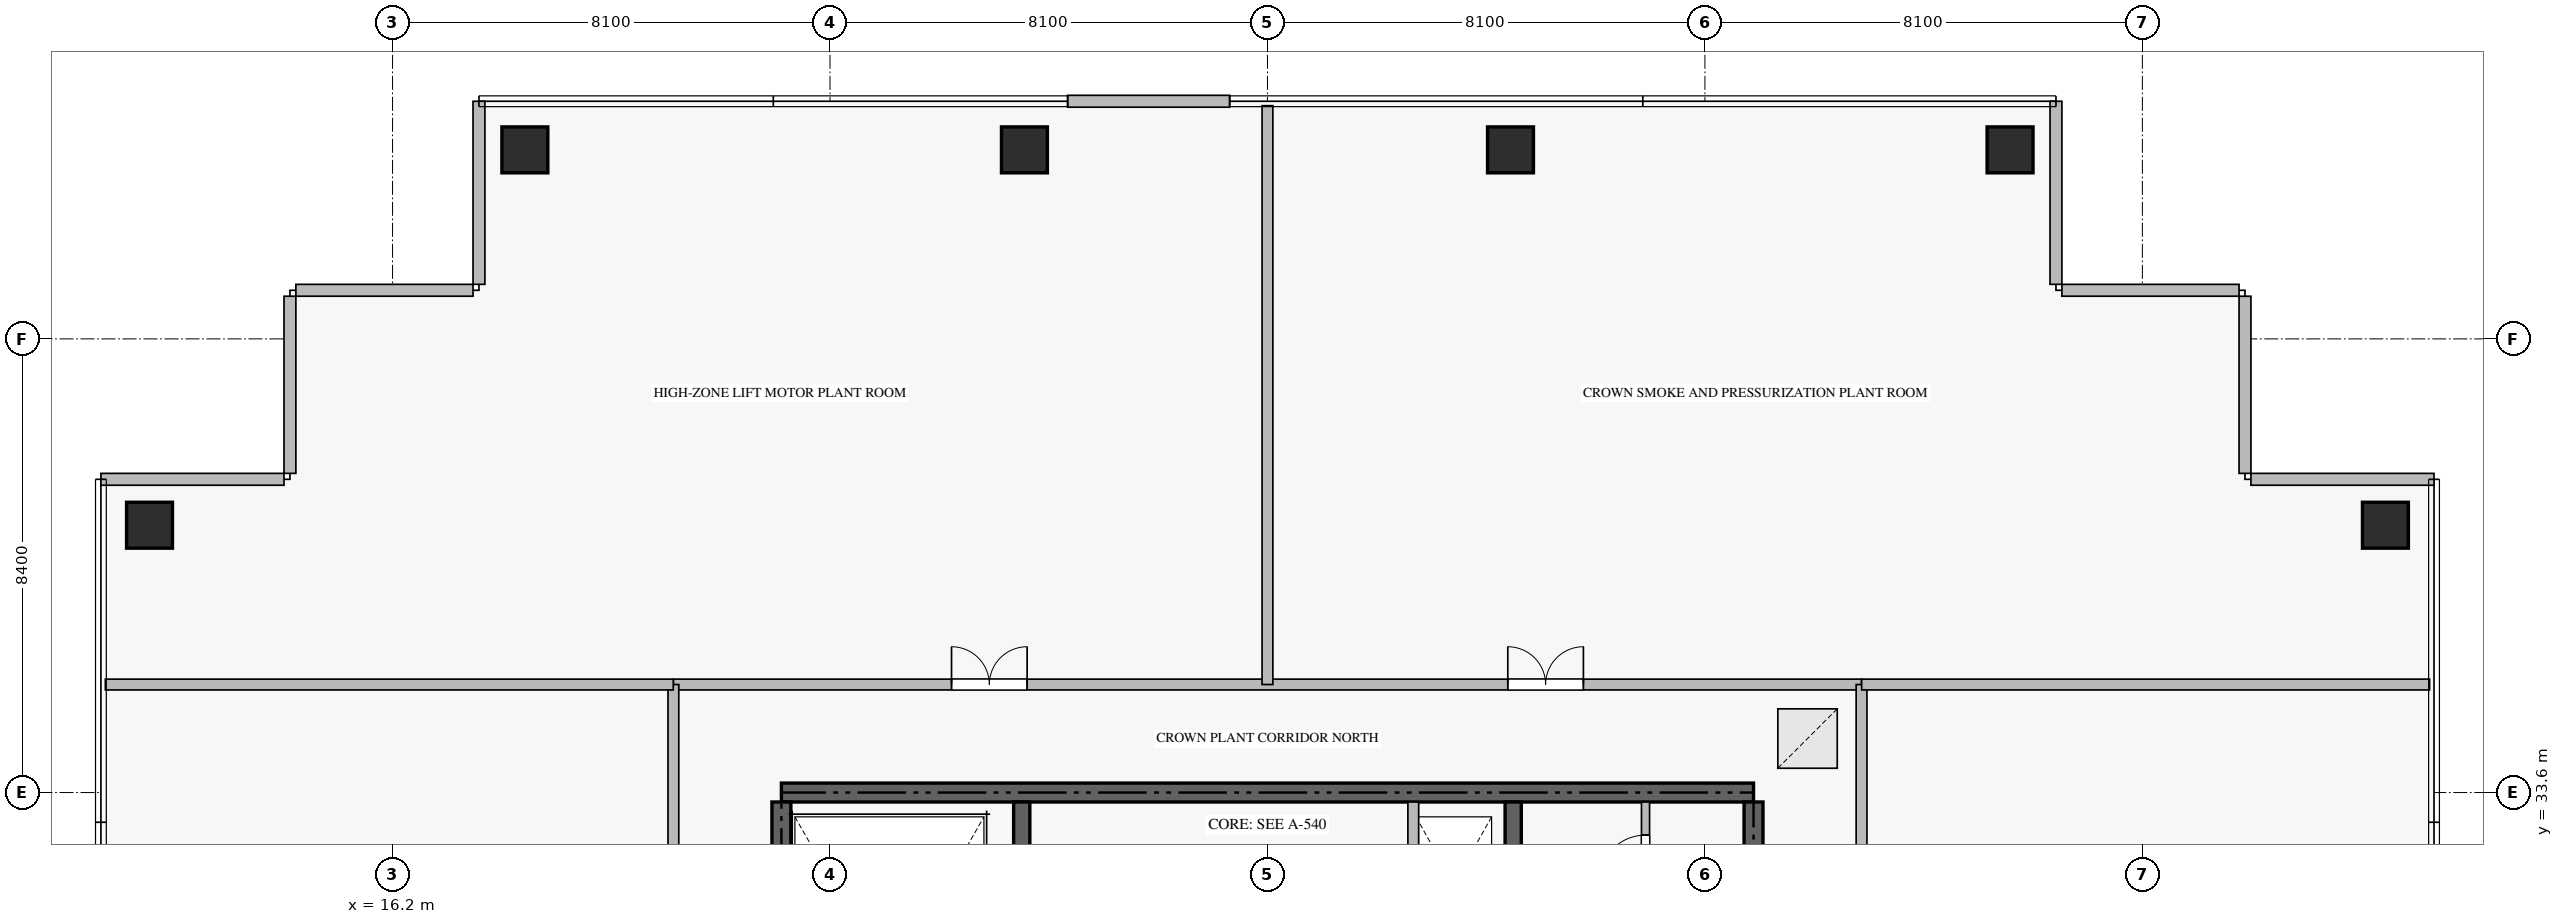
"""IFC4 building model, lengths in metres.
Left out: names, types, materials, properties, quantities, classifications, styles, units other than length and angle.
Written with IfcOpenShell. Run it as: python <this file> out.ifc"""

import sys

from ifc_helpers import new_model, si_unit, direction, frame, frame_2d, origin, origin_2d, place, context, subcontext, project, spatial, rectangle, extrude, source, transform, mapped, element, fill, save


model = new_model("IFC4")
c1 = context("Model", 3, precision=1e-05, world=origin(), true_north=direction((0.0, 1.0)))
c2 = subcontext(c1, "Body", "Model", "MODEL_VIEW")
j1 = project(units=[si_unit("LENGTHUNIT", "METRE"), si_unit("PLANEANGLEUNIT", "RADIAN")], contexts=[c1])
p1 = place(None, origin())
s1 = spatial("IfcSite", under=j1, at=p1, CompositionType="ELEMENT")
p2 = place(p1, origin())
s2 = spatial("IfcBuilding", under=s1, at=p2, CompositionType="ELEMENT")
p3 = place(p2, frame((0.0, 0.0, 365.75)))
s3 = spatial("IfcBuildingStorey", under=s2, at=p3, CompositionType="ELEMENT", Elevation=365.75)
p4 = place(p3, frame((41.4, 33.6, -0.36), z_axis=(0.0, 0.0, 1.0), x_axis=(-1.0, 0.0, 0.0)))
e1 = element("IfcWall", 1, at=p4, inside=s3, PredefinedType="SHEAR", context=c2, shape_type="SweptSolid", body=[
    extrude(rectangle(XDim=18.0, YDim=0.35, at=frame_2d((9.0, 0.0))), origin(), (0.0, 0.0, 1.0), 5.258),
])
p5 = place(p3, frame((23.4, 24.25, -0.36), z_axis=(0.0, 0.0, 1.0), x_axis=(0.0, 1.0, 0.0)))
e2 = element("IfcWall", 2, at=p5, inside=s3, PredefinedType="SHEAR", context=c2, shape_type="SweptSolid", body=[
    extrude(rectangle(XDim=9.175, YDim=0.35, at=frame_2d((4.587, 0.0))), origin(), (0.0, 0.0, 1.0), 5.258),
])
p6 = place(p3, frame((41.4, 27.75, -0.36), z_axis=(0.0, 0.0, 1.0), x_axis=(0.0, 1.0, 0.0)))
e3 = element("IfcWall", 3, at=p6, inside=s3, PredefinedType="SHEAR", context=c2, shape_type="SweptSolid", body=[
    extrude(rectangle(XDim=5.675, YDim=0.35, at=frame_2d((2.837, 0.0))), origin(), (0.0, 0.0, 1.0), 5.258),
])
p7 = place(p3, frame((27.85, 23.55, -0.36), z_axis=(0.0, 0.0, 1.0), x_axis=(0.0, 1.0, 0.0)))
e4 = element("IfcWall", 4, at=p7, inside=s3, PredefinedType="SHEAR", context=c2, shape_type="SweptSolid", body=[
    extrude(rectangle(XDim=9.875, YDim=0.3, at=frame_2d((4.938, 0.0))), origin(), (0.0, 0.0, 1.0), 5.258),
])
p8 = place(p3, frame((36.95, 27.05, -0.36), z_axis=(0.0, 0.0, 1.0), x_axis=(0.0, 1.0, 0.0)))
e5 = element("IfcWall", 5, at=p8, inside=s3, PredefinedType="SHEAR", context=c2, shape_type="SweptSolid", body=[
    extrude(rectangle(XDim=6.375, YDim=0.3, at=frame_2d((3.188, 0.0))), origin(), (0.0, 0.0, 1.0), 5.258),
])
m1 = source(origin(), c2, "Body", "SweptSolid", [
    extrude(rectangle(XDim=0.85, YDim=0.85, at=origin_2d()), origin(), (0.0, 0.0, 1.0), 5.26),
])
for number, where, z_axis, x_axis in (
    (6, (18.65, 45.5, -0.36), (0.0, 0.0, 1.0), (1.0, 0.0, 0.0)),
    (7, (27.9, 45.5, -0.36), (0.0, 0.0, 1.0), (1.0, 0.0, 0.0)),
    (8, (36.9, 45.5, -0.36), (0.0, 0.0, 1.0), (1.0, 0.0, 0.0)),
    (9, (46.15, 45.5, -0.36), (0.0, 0.0, 1.0), (1.0, 0.0, 0.0)),
    (10, (53.1, 38.55, -0.36), (0.0, 0.0, 1.0), (1.0, 0.0, 0.0)),
    (11, (11.7, 38.55, -0.36), (0.0, 0.0, 1.0), (1.0, 0.0, 0.0)),
):
    element("IfcColumn", number, at=place(p3, frame(where, z_axis=z_axis, x_axis=x_axis)), inside=s3, PredefinedType="COLUMN", context=c2, shape_type="MappedRepresentation", body=[
        mapped(m1, transform((0.0, 0.0, 0.0), scale=1.0)),
    ])
p9 = place(p3, frame((54.0, 39.4, 0.0), z_axis=(0.0, 0.0, 1.0), x_axis=(-1.0, 0.0, 0.0)))
e12 = element("IfcWall", 12, at=p9, inside=s3, PredefinedType="ELEMENTEDWALL", context=c2, shape_type="SweptSolid", body=[
    extrude(rectangle(XDim=3.39, YDim=0.22, at=frame_2d((1.695, 0.0))), origin(), (0.0, 0.0, 1.0), 4.885),
])
p10 = place(p3, frame((50.5, 39.51, 0.0), z_axis=(0.0, 0.0, 1.0), x_axis=(0.0, 1.0, 0.0)))
e13 = element("IfcWall", 13, at=p10, inside=s3, PredefinedType="ELEMENTEDWALL", context=c2, shape_type="SweptSolid", body=[
    extrude(rectangle(XDim=3.28, YDim=0.22, at=frame_2d((1.64, 0.0))), origin(), (0.0, 0.0, 1.0), 4.885),
])
p11 = place(p3, frame((50.39, 42.9, 0.0), z_axis=(0.0, 0.0, 1.0), x_axis=(-1.0, 0.0, 0.0)))
e14 = element("IfcWall", 14, at=p11, inside=s3, PredefinedType="ELEMENTEDWALL", context=c2, shape_type="SweptSolid", body=[
    extrude(rectangle(XDim=3.28, YDim=0.22, at=frame_2d((1.64, 0.0))), origin(), (0.0, 0.0, 1.0), 4.885),
])
p12 = place(p3, frame((47.0, 43.01, 0.0), z_axis=(0.0, 0.0, 1.0), x_axis=(0.0, 1.0, 0.0)))
e15 = element("IfcWall", 15, at=p12, inside=s3, PredefinedType="ELEMENTEDWALL", context=c2, shape_type="SweptSolid", body=[
    extrude(rectangle(XDim=3.39, YDim=0.22, at=frame_2d((1.695, 0.0))), origin(), (0.0, 0.0, 1.0), 4.885),
])
p13 = place(p3, frame((31.7, 46.4, 0.0), z_axis=(0.0, 0.0, 1.0), x_axis=(-1.0, 0.0, 0.0)))
e16 = element("IfcWall", 16, at=p13, inside=s3, PredefinedType="ELEMENTEDWALL", context=c2, shape_type="SweptSolid", body=[
    extrude(rectangle(XDim=3.0, YDim=0.22, at=frame_2d((1.5, 0.0))), origin(), (0.0, 0.0, 1.0), 4.885),
])
p14 = place(p3, frame((17.8, 46.4, 0.0), z_axis=(0.0, 0.0, 1.0), x_axis=(0.0, -1.0, 0.0)))
e17 = element("IfcWall", 17, at=p14, inside=s3, PredefinedType="ELEMENTEDWALL", context=c2, shape_type="SweptSolid", body=[
    extrude(rectangle(XDim=3.39, YDim=0.22, at=frame_2d((1.695, 0.0))), origin(), (0.0, 0.0, 1.0), 4.885),
])
for number, where, z_axis, x_axis in (
    (18, (17.69, 42.9, 0.0), (0.0, 0.0, 1.0), (-1.0, 0.0, 0.0)),
    (19, (14.3, 42.79, 0.0), (0.0, 0.0, 1.0), (0.0, -1.0, 0.0)),
):
    element("IfcWall", number, at=place(p3, frame(where, z_axis=z_axis, x_axis=x_axis)), inside=s3, PredefinedType="ELEMENTEDWALL", context=c2, shape_type="SweptSolid", body=[
        extrude(rectangle(XDim=3.28, YDim=0.22, at=frame_2d((1.64, 0.0))), origin(), (0.0, 0.0, 1.0), 4.885),
    ])
p15 = place(p3, frame((14.19, 39.4, 0.0), z_axis=(0.0, 0.0, 1.0), x_axis=(-1.0, 0.0, 0.0)))
e20 = element("IfcWall", 20, at=p15, inside=s3, PredefinedType="ELEMENTEDWALL", context=c2, shape_type="SweptSolid", body=[
    extrude(rectangle(XDim=3.39, YDim=0.22, at=frame_2d((1.695, 0.0))), origin(), (0.0, 0.0, 1.0), 4.885),
])
p16 = place(p3, frame((35.1, 30.75, 0.0), z_axis=(0.0, 0.0, 1.0), x_axis=(0.0, 1.0, 0.0)))
e21 = element("IfcWall", 21, at=p16, inside=s3, PredefinedType="STANDARD", context=c2, shape_type="SweptSolid", body=[
    extrude(rectangle(XDim=2.675, YDim=0.2, at=frame_2d((1.337, 0.0))), origin(), (0.0, 0.0, 1.0), 4.9),
])
p17 = place(p3, frame((39.4, 31.35, 0.0), z_axis=(0.0, 0.0, 1.0), x_axis=(0.0, 1.0, 0.0)))
e22 = element("IfcWall", 22, at=p17, inside=s3, PredefinedType="PARTITIONING", context=c2, shape_type="SweptSolid", body=[
    extrude(rectangle(XDim=2.075, YDim=0.15, at=frame_2d((1.038, 0.0))), origin(), (0.0, 0.0, 1.0), 4.9),
])
p18 = place(p17, frame((0.612, 0.0, 0.0)))
e23 = element("IfcOpeningElement", 23, at=p18, cuts=e22, PredefinedType="OPENING", context=c2, shape_type="SweptSolid", body=[
    extrude(rectangle(XDim=0.85, YDim=2.1, at=frame_2d((0.425, 1.05))), frame((0.0, 0.085, 0.0), z_axis=(0.0, -1.0, 0.0), x_axis=(1.0, 0.0, 0.0)), (0.0, 0.0, 1.0), 0.17),
])
p19 = place(p3, frame((21.4, 35.6, 0.0), z_axis=(0.0, 0.0, 1.0), x_axis=(1.0, 0.0, 0.0)))
e24 = element("IfcWall", 24, at=p19, inside=s3, PredefinedType="STANDARD", context=c2, shape_type="SweptSolid", body=[
    extrude(rectangle(XDim=22.0, YDim=0.2, at=frame_2d((11.0, 0.0))), origin(), (0.0, 0.0, 1.0), 4.9),
])
p20 = place(p19, frame((5.15, 0.0, 0.0)))
e25 = element("IfcOpeningElement", 25, at=p20, cuts=e24, PredefinedType="OPENING", context=c2, shape_type="SweptSolid", body=[
    extrude(rectangle(XDim=1.4, YDim=2.2, at=frame_2d((0.7, 1.1))), frame((0.0, 0.11, 0.0), z_axis=(0.0, -1.0, 0.0), x_axis=(1.0, 0.0, 0.0)), (0.0, 0.0, 1.0), 0.22),
])
p21 = place(p19, frame((15.45, 0.0, 0.0)))
e26 = element("IfcOpeningElement", 26, at=p21, cuts=e24, PredefinedType="OPENING", context=c2, shape_type="SweptSolid", body=[
    extrude(rectangle(XDim=1.4, YDim=2.2, at=frame_2d((0.7, 1.1))), frame((0.0, 0.11, 0.0), z_axis=(0.0, -1.0, 0.0), x_axis=(1.0, 0.0, 0.0)), (0.0, 0.0, 1.0), 0.22),
])
p22 = place(p3, frame((21.4, 14.8, 0.0), z_axis=(0.0, 0.0, 1.0), x_axis=(0.0, 1.0, 0.0)))
e27 = element("IfcWall", 27, at=p22, inside=s3, PredefinedType="STANDARD", context=c2, shape_type="SweptSolid", body=[
    extrude(rectangle(XDim=20.8, YDim=0.2, at=frame_2d((10.4, 0.0))), origin(), (0.0, 0.0, 1.0), 4.9),
])
p23 = place(p22, frame((9.7, 0.0, 0.0)))
e28 = element("IfcOpeningElement", 28, at=p23, cuts=e27, PredefinedType="OPENING", context=c2, shape_type="SweptSolid", body=[
    extrude(rectangle(XDim=1.4, YDim=2.2, at=frame_2d((0.7, 1.1))), frame((0.0, 0.11, 0.0), z_axis=(0.0, -1.0, 0.0), x_axis=(1.0, 0.0, 0.0)), (0.0, 0.0, 1.0), 0.22),
])
p24 = place(p3, frame((43.4, 14.8, 0.0), z_axis=(0.0, 0.0, 1.0), x_axis=(0.0, 1.0, 0.0)))
e29 = element("IfcWall", 29, at=p24, inside=s3, PredefinedType="STANDARD", context=c2, shape_type="SweptSolid", body=[
    extrude(rectangle(XDim=20.8, YDim=0.2, at=frame_2d((10.4, 0.0))), origin(), (0.0, 0.0, 1.0), 4.9),
])
p25 = place(p24, frame((9.7, 0.0, 0.0)))
e30 = element("IfcOpeningElement", 30, at=p25, cuts=e29, PredefinedType="OPENING", context=c2, shape_type="SweptSolid", body=[
    extrude(rectangle(XDim=1.4, YDim=2.2, at=frame_2d((0.7, 1.1))), frame((0.0, 0.11, 0.0), z_axis=(0.0, -1.0, 0.0), x_axis=(1.0, 0.0, 0.0)), (0.0, 0.0, 1.0), 0.22),
])
for number, where, z_axis, x_axis in (
    (31, (10.882, 35.6, 0.0), (0.0, 0.0, 1.0), (1.0, 0.0, 0.0)),
    (32, (43.402, 35.6, 0.0), (0.0, 0.0, 1.0), (1.0, 0.0, 0.0)),
):
    element("IfcWall", number, at=place(p3, frame(where, z_axis=z_axis, x_axis=x_axis)), inside=s3, PredefinedType="STANDARD", context=c2, shape_type="SweptSolid", body=[
        extrude(rectangle(XDim=10.516, YDim=0.2, at=frame_2d((5.258, 0.0))), origin(), (0.0, 0.0, 1.0), 4.9),
    ])
p26 = place(p3, frame((32.4, 35.6, 0.0), z_axis=(0.0, 0.0, 1.0), x_axis=(0.0, 1.0, 0.0)))
e33 = element("IfcWall", 33, at=p26, inside=s3, PredefinedType="STANDARD", context=c2, shape_type="SweptSolid", body=[
    extrude(rectangle(XDim=10.718, YDim=0.2, at=frame_2d((5.359, 0.0))), origin(), (0.0, 0.0, 1.0), 4.9),
])
p27 = place(p2, frame((0.0, 0.0, 370.95)))
p28 = place(p27, frame((0.0, 0.0, -0.3)))
p29 = place(p28, frame((42.4, 34.6, 0.0)))
p30 = place(p29, frame((0.0, 0.0, 0.26)))
e34 = element("IfcDoor", 34, at=p30, inside=s3, OperationType="SINGLE_SWING_LEFT", PredefinedType="TRAPDOOR", context=c2, shape_type="SweptSolid", body=[
    extrude(rectangle(XDim=1.1, YDim=1.1, at=origin_2d()), origin(), (0.0, 0.0, 1.0), 0.04),
])
m2 = source(origin(), c2, "Body", "SweptSolid", [
    extrude(rectangle(XDim=0.85, YDim=2.1, at=frame_2d((0.425, 1.05))), frame((0.0, 0.025, 0.0), z_axis=(0.0, -1.0, 0.0), x_axis=(1.0, 0.0, 0.0)), (0.0, 0.0, 1.0), 0.05),
])
p31 = place(p18, origin())
e35 = element("IfcDoor", 35, at=p31, inside=s3, OperationType="SINGLE_SWING_LEFT", PredefinedType="DOOR", context=c2, shape_type="MappedRepresentation", body=[
    mapped(m2, transform((0.0, 0.0, 0.0), scale=1.0)),
])
fill(e23, e35)
m3 = source(origin(), c2, "Body", "SweptSolid", [
    extrude(rectangle(XDim=1.4, YDim=2.2, at=frame_2d((0.7, 1.1))), frame((0.0, 0.025, 0.0), z_axis=(0.0, -1.0, 0.0), x_axis=(1.0, 0.0, 0.0)), (0.0, 0.0, 1.0), 0.05),
])
p32 = place(p20, origin())
e36 = element("IfcDoor", 36, at=p32, inside=s3, OperationType="DOUBLE_DOOR_SINGLE_SWING", PredefinedType="DOOR", context=c2, shape_type="MappedRepresentation", body=[
    mapped(m3, transform((0.0, 0.0, 0.0), scale=1.0)),
])
fill(e25, e36)
p33 = place(p21, origin())
e37 = element("IfcDoor", 37, at=p33, inside=s3, OperationType="DOUBLE_DOOR_SINGLE_SWING", PredefinedType="DOOR", context=c2, shape_type="MappedRepresentation", body=[
    mapped(m3, transform((0.0, 0.0, 0.0), scale=1.0)),
])
fill(e26, e37)
save(model, sys.argv[1])
